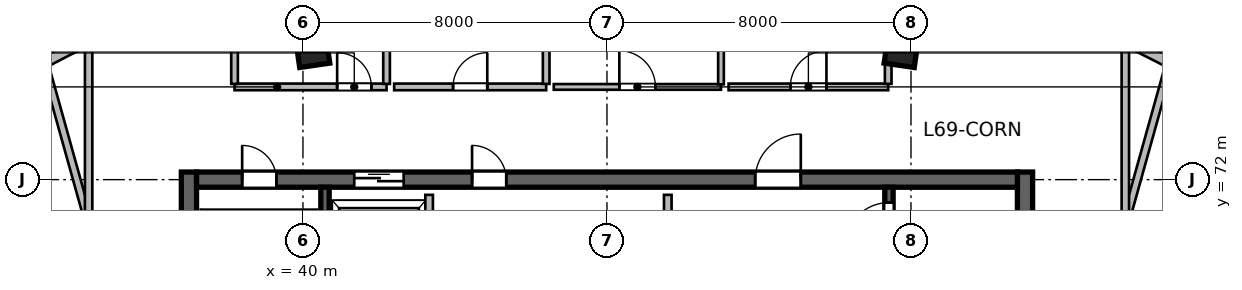
"""IFC4 building model, lengths in metres.
Left out: names, types, materials, properties, quantities, classifications, styles, units other than length and angle.
Written with IfcOpenShell. Run it as: python <this file> out.ifc"""

import sys

from ifc_helpers import new_model, si_unit, direction, frame, frame_2d, origin, origin_2d, place, context, subcontext, project, spatial, rectangle, extrude, source, transform, mapped, element, fill, save


model = new_model("IFC4")
c1 = context("Model", 3, precision=1e-05, world=origin(), true_north=direction((0.0, 1.0)))
c2 = subcontext(c1, "Body", "Model", "MODEL_VIEW")
j1 = project(units=[si_unit("LENGTHUNIT", "METRE"), si_unit("PLANEANGLEUNIT", "RADIAN")], contexts=[c1])
p1 = place(None, origin())
s1 = spatial("IfcSite", under=j1, at=p1, CompositionType="ELEMENT")
p2 = place(p1, origin())
s2 = spatial("IfcBuilding", under=s1, at=p2, CompositionType="ELEMENT")
p3 = place(p2, frame((0.0, 0.0, 283.5)))
s3 = spatial("IfcBuildingStorey", under=s2, at=p3, CompositionType="ELEMENT", Elevation=283.5)
m1 = source(origin(), c2, "Body", "SweptSolid", [
    extrude(rectangle(XDim=12.0, YDim=0.4, at=frame_2d((6.0, 0.0))), origin(), (0.0, 0.0, 1.0), 3.9),
])
for number, where, z_axis, x_axis in (
    (1, (37.0, 60.2, 0.0), (0.0, 0.0, 1.0), (0.0, 1.0, 0.0)),
    (2, (59.0, 60.2, 0.0), (0.0, 0.0, 1.0), (0.0, 1.0, 0.0)),
):
    element("IfcWall", number, at=place(p3, frame(where, z_axis=z_axis, x_axis=x_axis)), inside=s3, PredefinedType="SHEAR", context=c2, shape_type="MappedRepresentation", body=[
        mapped(m1, transform((0.0, 0.0, 0.0), scale=1.0)),
    ])
m2 = source(origin(), c2, "Body", "SweptSolid", [
    extrude(rectangle(XDim=21.6, YDim=0.4, at=frame_2d((10.8, 0.0))), origin(), (0.0, 0.0, 1.0), 3.9),
])
p4 = place(p3, frame((37.2, 72.0, 0.0), z_axis=(0.0, 0.0, 1.0), x_axis=(1.0, 0.0, 0.0)))
e3 = element("IfcWall", 3, at=p4, inside=s3, PredefinedType="SHEAR", context=c2, shape_type="MappedRepresentation", body=[
    mapped(m2, transform((0.0, 0.0, 0.0), scale=1.0)),
])
p5 = place(p4, frame((1.2, 0.0, 0.0)))
e4 = element("IfcOpeningElement", 4, at=p5, cuts=e3, PredefinedType="OPENING", context=c2, shape_type="SweptSolid", body=[
    extrude(rectangle(XDim=0.9, YDim=2.1, at=frame_2d((0.45, 1.05))), frame((0.0, 0.21, 0.0), z_axis=(0.0, -1.0, 0.0), x_axis=(1.0, 0.0, 0.0)), (0.0, 0.0, 1.0), 0.42),
])
p6 = place(p4, frame((14.7, 0.0, 0.0)))
e5 = element("IfcOpeningElement", 5, at=p6, cuts=e3, PredefinedType="OPENING", context=c2, shape_type="SweptSolid", body=[
    extrude(rectangle(XDim=1.2, YDim=2.15, at=frame_2d((0.6, 1.075))), frame((0.0, 0.21, 0.0), z_axis=(0.0, -1.0, 0.0), x_axis=(1.0, 0.0, 0.0)), (0.0, 0.0, 1.0), 0.42),
])
p7 = place(p4, frame((4.15, 0.0, 0.0)))
e6 = element("IfcOpeningElement", 6, at=p7, cuts=e3, PredefinedType="OPENING", context=c2, shape_type="SweptSolid", body=[
    extrude(rectangle(XDim=1.3, YDim=2.15, at=frame_2d((0.65, 1.075))), frame((0.0, 0.21, 0.0), z_axis=(0.0, -1.0, 0.0), x_axis=(1.0, 0.0, 0.0)), (0.0, 0.0, 1.0), 0.42),
])
p8 = place(p4, frame((7.25, 0.0, 0.0)))
e7 = element("IfcOpeningElement", 7, at=p8, cuts=e3, PredefinedType="OPENING", context=c2, shape_type="SweptSolid", body=[
    extrude(rectangle(XDim=0.9, YDim=2.1, at=frame_2d((0.45, 1.05))), frame((0.0, 0.21, 0.0), z_axis=(0.0, -1.0, 0.0), x_axis=(1.0, 0.0, 0.0)), (0.0, 0.0, 1.0), 0.42),
])
m3 = source(origin(), c2, "Body", "SweptSolid", [
    extrude(rectangle(XDim=11.2, YDim=0.22, at=frame_2d((5.6, 0.0))), origin(), (0.0, 0.0, 1.0), 3.9),
])
p9 = place(p3, frame((40.58, 60.6, 0.0), z_axis=(0.0, 0.0, 1.0), x_axis=(0.0, 1.0, 0.0)))
e8 = element("IfcWall", 8, at=p9, inside=s3, PredefinedType="SHEAR", context=c2, shape_type="MappedRepresentation", body=[
    mapped(m3, transform((0.0, 0.0, 0.0), scale=1.0)),
])
p10 = place(p3, frame((55.42, 60.6, 0.0), z_axis=(0.0, 0.0, 1.0), x_axis=(0.0, 1.0, 0.0)))
e9 = element("IfcWall", 9, at=p10, inside=s3, PredefinedType="SHEAR", context=c2, shape_type="MappedRepresentation", body=[
    mapped(m3, transform((0.0, 0.0, 0.0), scale=1.0)),
])
p11 = place(p10, frame((9.645, 0.0, 0.0)))
e10 = element("IfcOpeningElement", 10, at=p11, cuts=e9, PredefinedType="OPENING", context=c2, shape_type="SweptSolid", body=[
    extrude(rectangle(XDim=1.15, YDim=2.15, at=frame_2d((0.575, 1.075))), frame((0.0, 0.12, 0.0), z_axis=(0.0, -1.0, 0.0), x_axis=(1.0, 0.0, 0.0)), (0.0, 0.0, 1.0), 0.24),
])
m4 = source(origin(), c2, "Body", "SweptSolid", [
    extrude(rectangle(XDim=0.8, YDim=0.8, at=origin_2d()), origin(), (0.0, 0.0, 1.0), 3.9),
])
for number, where, z_axis, x_axis in (
    (11, (40.253, 75.404, 0.0), (0.0, 0.0, 1.0), (-0.143, 0.99, 0.0)),
    (12, (55.747, 75.404, 0.0), (0.0, 0.0, 1.0), (0.143, 0.99, 0.0)),
):
    element("IfcColumn", number, at=place(p3, frame(where, z_axis=z_axis, x_axis=x_axis)), inside=s3, PredefinedType="COLUMN", context=c2, shape_type="MappedRepresentation", body=[
        mapped(m4, transform((0.0, 0.0, 0.0), scale=1.0)),
    ])
m5 = source(origin(), c2, "Body", "SweptSolid", [
    extrude(rectangle(XDim=2.711, YDim=0.28, at=frame_2d((1.356, 0.0))), origin(), (0.0, 0.0, 1.0), 3.64),
])
p12 = place(p3, frame((31.502, 74.205, 0.0), z_axis=(0.0, 0.0, 1.0), x_axis=(0.886828760751, 0.462098202881, 0.0)))
e13 = element("IfcWall", 13, at=p12, inside=s3, PredefinedType="SOLIDWALL", context=c2, shape_type="MappedRepresentation", body=[
    mapped(m5, transform((0.0, 0.0, 0.0), scale=1.0)),
])
m6 = source(origin(), c2, "Body", "SweptSolid", [
    extrude(rectangle(XDim=2.673, YDim=0.28, at=frame_2d((1.337, 0.0))), origin(), (0.0, 0.0, 1.0), 3.64),
])
p13 = place(p3, frame((33.907, 75.458, 0.0), z_axis=(0.0, 0.0, 1.0), x_axis=(0.919036345912, 0.394172798266, 0.0)))
e14 = element("IfcWall", 14, at=p13, inside=s3, PredefinedType="SOLIDWALL", context=c2, shape_type="MappedRepresentation", body=[
    mapped(m6, transform((0.0, 0.0, 0.0), scale=1.0)),
])
m7 = source(origin(), c2, "Body", "SweptSolid", [
    extrude(rectangle(XDim=2.706, YDim=0.28, at=frame_2d((1.353, 0.0))), origin(), (0.0, 0.0, 1.0), 3.64),
])
p14 = place(p3, frame((61.745, 75.62, 0.0), z_axis=(0.0, 0.0, 1.0), x_axis=(0.891648836287, -0.452727680564, 0.0)))
e15 = element("IfcWall", 15, at=p14, inside=s3, PredefinedType="SOLIDWALL", context=c2, shape_type="MappedRepresentation", body=[
    mapped(m7, transform((0.0, 0.0, 0.0), scale=1.0)),
])
m8 = source(origin(), c2, "Body", "SweptSolid", [
    extrude(rectangle(XDim=5.8, YDim=0.2, at=frame_2d((2.9, 0.0))), origin(), (0.0, 0.0, 1.0), 3.64),
])
p15 = place(p3, frame((49.6, 65.8, 0.0), z_axis=(0.0, 0.0, 1.0), x_axis=(0.0, 1.0, 0.0)))
e16 = element("IfcWall", 16, at=p15, inside=s3, PredefinedType="SOLIDWALL", context=c2, shape_type="MappedRepresentation", body=[
    mapped(m8, transform((0.0, 0.0, 0.0), scale=1.0)),
])
m9 = source(origin(), c2, "Body", "SweptSolid", [
    extrude(rectangle(XDim=3.2, YDim=0.2, at=frame_2d((1.6, 0.0))), origin(), (0.0, 0.0, 1.0), 3.64),
])
p16 = place(p3, frame((43.32, 68.4, 0.0), z_axis=(0.0, 0.0, 1.0), x_axis=(0.0, 1.0, 0.0)))
e17 = element("IfcWall", 17, at=p16, inside=s3, PredefinedType="SOLIDWALL", context=c2, shape_type="MappedRepresentation", body=[
    mapped(m9, transform((0.0, 0.0, 0.0), scale=1.0)),
])
m10 = source(origin(), c2, "Body", "SweptSolid", [
    extrude(rectangle(XDim=4.0, YDim=0.175, at=frame_2d((2.0, 0.0))), origin(), (0.0, 0.0, 1.0), 3.64),
])
p17 = place(p3, frame((38.2, 74.44, 0.0), z_axis=(0.0, 0.0, 1.0), x_axis=(1.0, 0.0, 0.0)))
e18 = element("IfcWall", 18, at=p17, inside=s3, PredefinedType="PARTITIONING", context=c2, shape_type="MappedRepresentation", body=[
    mapped(m10, transform((0.0, 0.0, 0.0), scale=1.0)),
])
p18 = place(p17, frame((2.7, 0.0, 0.0)))
e19 = element("IfcOpeningElement", 19, at=p18, cuts=e18, PredefinedType="OPENING", context=c2, shape_type="SweptSolid", body=[
    extrude(rectangle(XDim=0.9, YDim=2.08, at=frame_2d((0.45, 1.04))), frame((0.0, 0.098, 0.0), z_axis=(0.0, -1.0, 0.0), x_axis=(1.0, 0.0, 0.0)), (0.0, 0.0, 1.0), 0.195),
])
m11 = source(origin(), c2, "Body", "SweptSolid", [
    extrude(rectangle(XDim=2.403, YDim=0.175, at=frame_2d((1.201, 0.0))), origin(), (0.0, 0.0, 1.0), 3.64),
])
for number, where, z_axis, x_axis in (
    (20, (38.2, 74.519, 0.0), (0.0, 0.0, 1.0), (0.0, 1.0, 0.0)),
    (21, (42.2, 74.519, 0.0), (0.0, 0.0, 1.0), (0.0, 1.0, 0.0)),
):
    element("IfcWall", number, at=place(p3, frame(where, z_axis=z_axis, x_axis=x_axis)), inside=s3, PredefinedType="PARTITIONING", context=c2, shape_type="MappedRepresentation", body=[
        mapped(m11, transform((0.0, 0.0, 0.0), scale=1.0)),
    ])
p19 = place(p3, frame((42.4, 74.44, 0.0), z_axis=(0.0, 0.0, 1.0), x_axis=(1.0, 0.0, 0.0)))
e22 = element("IfcWall", 22, at=p19, inside=s3, PredefinedType="PARTITIONING", context=c2, shape_type="MappedRepresentation", body=[
    mapped(m10, transform((0.0, 0.0, 0.0), scale=1.0)),
])
p20 = place(p19, frame((1.55, 0.0, 0.0)))
e23 = element("IfcOpeningElement", 23, at=p20, cuts=e22, PredefinedType="OPENING", context=c2, shape_type="SweptSolid", body=[
    extrude(rectangle(XDim=0.9, YDim=2.08, at=frame_2d((0.45, 1.04))), frame((0.0, 0.098, 0.0), z_axis=(0.0, -1.0, 0.0), x_axis=(1.0, 0.0, 0.0)), (0.0, 0.0, 1.0), 0.195),
])
p21 = place(p3, frame((46.4, 74.519, 0.0), z_axis=(0.0, 0.0, 1.0), x_axis=(0.0, 1.0, 0.0)))
e24 = element("IfcWall", 24, at=p21, inside=s3, PredefinedType="PARTITIONING", context=c2, shape_type="MappedRepresentation", body=[
    mapped(m11, transform((0.0, 0.0, 0.0), scale=1.0)),
])
m12 = source(origin(), c2, "Body", "SweptSolid", [
    extrude(rectangle(XDim=4.4, YDim=0.15, at=frame_2d((2.2, 0.0))), origin(), (0.0, 0.0, 1.0), 3.64),
])
p22 = place(p3, frame((46.6, 74.44, 0.0), z_axis=(0.0, 0.0, 1.0), x_axis=(1.0, 0.0, 0.0)))
e25 = element("IfcWall", 25, at=p22, inside=s3, PredefinedType="PARTITIONING", context=c2, shape_type="MappedRepresentation", body=[
    mapped(m12, transform((0.0, 0.0, 0.0), scale=1.0)),
])
p23 = place(p22, frame((1.725, 0.0, 0.0)))
e26 = element("IfcOpeningElement", 26, at=p23, cuts=e25, PredefinedType="OPENING", context=c2, shape_type="SweptSolid", body=[
    extrude(rectangle(XDim=0.95, YDim=2.1, at=frame_2d((0.475, 1.05))), frame((0.0, 0.085, 0.0), z_axis=(0.0, -1.0, 0.0), x_axis=(1.0, 0.0, 0.0)), (0.0, 0.0, 1.0), 0.17),
])
m13 = source(origin(), c2, "Body", "SweptSolid", [
    extrude(rectangle(XDim=2.425, YDim=0.15, at=frame_2d((1.212, 0.0))), origin(), (0.0, 0.0, 1.0), 3.64),
])
p24 = place(p3, frame((51.0, 74.508, 0.0), z_axis=(0.0, 0.0, 1.0), x_axis=(0.0, 1.0, 0.0)))
e27 = element("IfcWall", 27, at=p24, inside=s3, PredefinedType="PARTITIONING", context=c2, shape_type="MappedRepresentation", body=[
    mapped(m13, transform((0.0, 0.0, 0.0), scale=1.0)),
])
m14 = source(origin(), c2, "Body", "SweptSolid", [
    extrude(rectangle(XDim=4.2, YDim=0.175, at=frame_2d((2.1, 0.0))), origin(), (0.0, 0.0, 1.0), 3.64),
])
p25 = place(p3, frame((51.2, 74.44, 0.0), z_axis=(0.0, 0.0, 1.0), x_axis=(1.0, 0.0, 0.0)))
e28 = element("IfcWall", 28, at=p25, inside=s3, PredefinedType="PARTITIONING", context=c2, shape_type="MappedRepresentation", body=[
    mapped(m14, transform((0.0, 0.0, 0.0), scale=1.0)),
])
p26 = place(p25, frame((1.625, 0.0, 0.0)))
e29 = element("IfcOpeningElement", 29, at=p26, cuts=e28, PredefinedType="OPENING", context=c2, shape_type="SweptSolid", body=[
    extrude(rectangle(XDim=0.95, YDim=2.12, at=frame_2d((0.475, 1.06))), frame((0.0, 0.098, 0.0), z_axis=(0.0, -1.0, 0.0), x_axis=(1.0, 0.0, 0.0)), (0.0, 0.0, 1.0), 0.195),
])
p27 = place(p3, frame((55.4, 74.519, 0.0), z_axis=(0.0, 0.0, 1.0), x_axis=(0.0, 1.0, 0.0)))
e30 = element("IfcWall", 30, at=p27, inside=s3, PredefinedType="PARTITIONING", context=c2, shape_type="MappedRepresentation", body=[
    mapped(m11, transform((0.0, 0.0, 0.0), scale=1.0)),
])
m15 = source(origin(), c2, "Body", "SweptSolid", [
    extrude(rectangle(XDim=12.311, YDim=0.195, at=frame_2d((6.155, 0.0))), origin(), (0.0, 0.0, 1.0), 3.64),
])
p28 = place(p3, frame((36.5, 63.216, 0.0), z_axis=(0.0, 0.0, 1.0), x_axis=(-0.268759602651, 0.963207286093, 0.0)))
e31 = element("IfcWall", 31, at=p28, inside=s3, PredefinedType="PARTITIONING", context=c2, shape_type="MappedRepresentation", body=[
    mapped(m15, transform((0.0, 0.0, 0.0), scale=1.0)),
])
m16 = source(origin(), c2, "Body", "SweptSolid", [
    extrude(rectangle(XDim=17.681, YDim=0.195, at=frame_2d((8.84, 0.0))), origin(), (0.0, 0.0, 1.0), 3.64),
])
p29 = place(p3, frame((34.36, 57.96, 0.0), z_axis=(0.0, 0.0, 1.0), x_axis=(0.0, 1.0, 0.0)))
e32 = element("IfcWall", 32, at=p29, inside=s3, PredefinedType="PARTITIONING", context=c2, shape_type="MappedRepresentation", body=[
    mapped(m16, transform((0.0, 0.0, 0.0), scale=1.0)),
])
m17 = source(origin(), c2, "Body", "SweptSolid", [
    extrude(rectangle(XDim=12.307, YDim=0.195, at=frame_2d((6.153, 0.0))), origin(), (0.0, 0.0, 1.0), 3.64),
])
p30 = place(p3, frame((59.5, 63.216, 0.0), z_axis=(0.0, 0.0, 1.0), x_axis=(0.268768150257, 0.96320490105, 0.0)))
e33 = element("IfcWall", 33, at=p30, inside=s3, PredefinedType="PARTITIONING", context=c2, shape_type="MappedRepresentation", body=[
    mapped(m17, transform((0.0, 0.0, 0.0), scale=1.0)),
])
m18 = source(origin(), c2, "Body", "SweptSolid", [
    extrude(rectangle(XDim=17.664, YDim=0.195, at=frame_2d((8.832, 0.0))), origin(), (0.0, 0.0, 1.0), 3.64),
])
p31 = place(p3, frame((61.333, 55.602, 0.0), z_axis=(0.0, 0.0, 1.0), x_axis=(0.368827513738, 0.929497856431, 0.0)))
e34 = element("IfcWall", 34, at=p31, inside=s3, PredefinedType="PARTITIONING", context=c2, shape_type="MappedRepresentation", body=[
    mapped(m18, transform((0.0, 0.0, 0.0), scale=1.0)),
])
m19 = source(origin(), c2, "Body", "SweptSolid", [
    extrude(rectangle(XDim=17.693, YDim=0.195, at=frame_2d((8.847, 0.0))), origin(), (0.0, 0.0, 1.0), 3.64),
])
p32 = place(p3, frame((61.64, 57.96, 0.0), z_axis=(0.0, 0.0, 1.0), x_axis=(0.0, 1.0, 0.0)))
e35 = element("IfcWall", 35, at=p32, inside=s3, PredefinedType="PARTITIONING", context=c2, shape_type="MappedRepresentation", body=[
    mapped(m19, transform((0.0, 0.0, 0.0), scale=1.0)),
])
m20 = source(origin(), c2, "Body", "SweptSolid", [
    extrude(rectangle(XDim=0.9, YDim=2.1, at=frame_2d((0.45, 1.05))), frame((0.0, 0.025, 0.0), z_axis=(0.0, -1.0, 0.0), x_axis=(1.0, 0.0, 0.0)), (0.0, 0.0, 1.0), 0.05),
])
p33 = place(p5, origin())
e36 = element("IfcDoor", 36, at=p33, inside=s3, OperationType="SINGLE_SWING_LEFT", PredefinedType="DOOR", context=c2, shape_type="MappedRepresentation", body=[
    mapped(m20, transform((0.0, 0.0, 0.0), scale=1.0)),
])
fill(e4, e36)
m21 = source(origin(), c2, "Body", "SweptSolid", [
    extrude(rectangle(XDim=1.15, YDim=2.15, at=frame_2d((0.575, 1.075))), frame((0.0, 0.025, 0.0), z_axis=(0.0, -1.0, 0.0), x_axis=(1.0, 0.0, 0.0)), (0.0, 0.0, 1.0), 0.05),
])
p34 = place(p11, origin())
e37 = element("IfcDoor", 37, at=p34, inside=s3, OperationType="SINGLE_SWING_LEFT", PredefinedType="DOOR", context=c2, shape_type="MappedRepresentation", body=[
    mapped(m21, transform((0.0, 0.0, 0.0), scale=1.0)),
])
fill(e10, e37)
m22 = source(origin(), c2, "Body", "SweptSolid", [
    extrude(rectangle(XDim=1.2, YDim=2.15, at=frame_2d((0.6, 1.075))), frame((0.0, 0.025, 0.0), z_axis=(0.0, -1.0, 0.0), x_axis=(1.0, 0.0, 0.0)), (0.0, 0.0, 1.0), 0.05),
])
p35 = place(p6, origin())
e38 = element("IfcDoor", 38, at=p35, inside=s3, OperationType="SINGLE_SWING_RIGHT", PredefinedType="DOOR", context=c2, shape_type="MappedRepresentation", body=[
    mapped(m22, transform((0.0, 0.0, 0.0), scale=1.0)),
])
fill(e5, e38)
m23 = source(origin(), c2, "Body", "SweptSolid", [
    extrude(rectangle(XDim=1.3, YDim=2.15, at=frame_2d((0.65, 1.075))), frame((0.0, 0.025, 0.0), z_axis=(0.0, -1.0, 0.0), x_axis=(1.0, 0.0, 0.0)), (0.0, 0.0, 1.0), 0.05),
])
p36 = place(p7, origin())
e39 = element("IfcDoor", 39, at=p36, inside=s3, OperationType="DOUBLE_DOOR_SLIDING", PredefinedType="DOOR", context=c2, shape_type="MappedRepresentation", body=[
    mapped(m23, transform((0.0, 0.0, 0.0), scale=1.0)),
])
fill(e6, e39)
p37 = place(p8, origin())
e40 = element("IfcDoor", 40, at=p37, inside=s3, OperationType="SINGLE_SWING_LEFT", PredefinedType="DOOR", context=c2, shape_type="MappedRepresentation", body=[
    mapped(m20, transform((0.0, 0.0, 0.0), scale=1.0)),
])
fill(e7, e40)
m24 = source(origin(), c2, "Body", "SweptSolid", [
    extrude(rectangle(XDim=0.9, YDim=2.08, at=frame_2d((0.45, 1.04))), frame((0.0, 0.025, 0.0), z_axis=(0.0, -1.0, 0.0), x_axis=(1.0, 0.0, 0.0)), (0.0, 0.0, 1.0), 0.05),
])
p38 = place(p18, origin())
e41 = element("IfcDoor", 41, at=p38, inside=s3, OperationType="SINGLE_SWING_LEFT", PredefinedType="DOOR", context=c2, shape_type="MappedRepresentation", body=[
    mapped(m24, transform((0.0, 0.0, 0.0), scale=1.0)),
])
fill(e19, e41)
p39 = place(p20, origin())
e42 = element("IfcDoor", 42, at=p39, inside=s3, OperationType="SINGLE_SWING_RIGHT", PredefinedType="DOOR", context=c2, shape_type="MappedRepresentation", body=[
    mapped(m24, transform((0.0, 0.0, 0.0), scale=1.0)),
])
fill(e23, e42)
m25 = source(origin(), c2, "Body", "SweptSolid", [
    extrude(rectangle(XDim=0.95, YDim=2.1, at=frame_2d((0.475, 1.05))), frame((0.0, 0.025, 0.0), z_axis=(0.0, -1.0, 0.0), x_axis=(1.0, 0.0, 0.0)), (0.0, 0.0, 1.0), 0.05),
])
p40 = place(p23, origin())
e43 = element("IfcDoor", 43, at=p40, inside=s3, OperationType="SINGLE_SWING_LEFT", PredefinedType="DOOR", context=c2, shape_type="MappedRepresentation", body=[
    mapped(m25, transform((0.0, 0.0, 0.0), scale=1.0)),
])
fill(e26, e43)
m26 = source(origin(), c2, "Body", "SweptSolid", [
    extrude(rectangle(XDim=0.95, YDim=2.12, at=frame_2d((0.475, 1.06))), frame((0.0, 0.025, 0.0), z_axis=(0.0, -1.0, 0.0), x_axis=(1.0, 0.0, 0.0)), (0.0, 0.0, 1.0), 0.05),
])
p41 = place(p26, origin())
e44 = element("IfcDoor", 44, at=p41, inside=s3, OperationType="SINGLE_SWING_RIGHT", PredefinedType="DOOR", context=c2, shape_type="MappedRepresentation", body=[
    mapped(m26, transform((0.0, 0.0, 0.0), scale=1.0)),
])
fill(e29, e44)
save(model, sys.argv[1])
